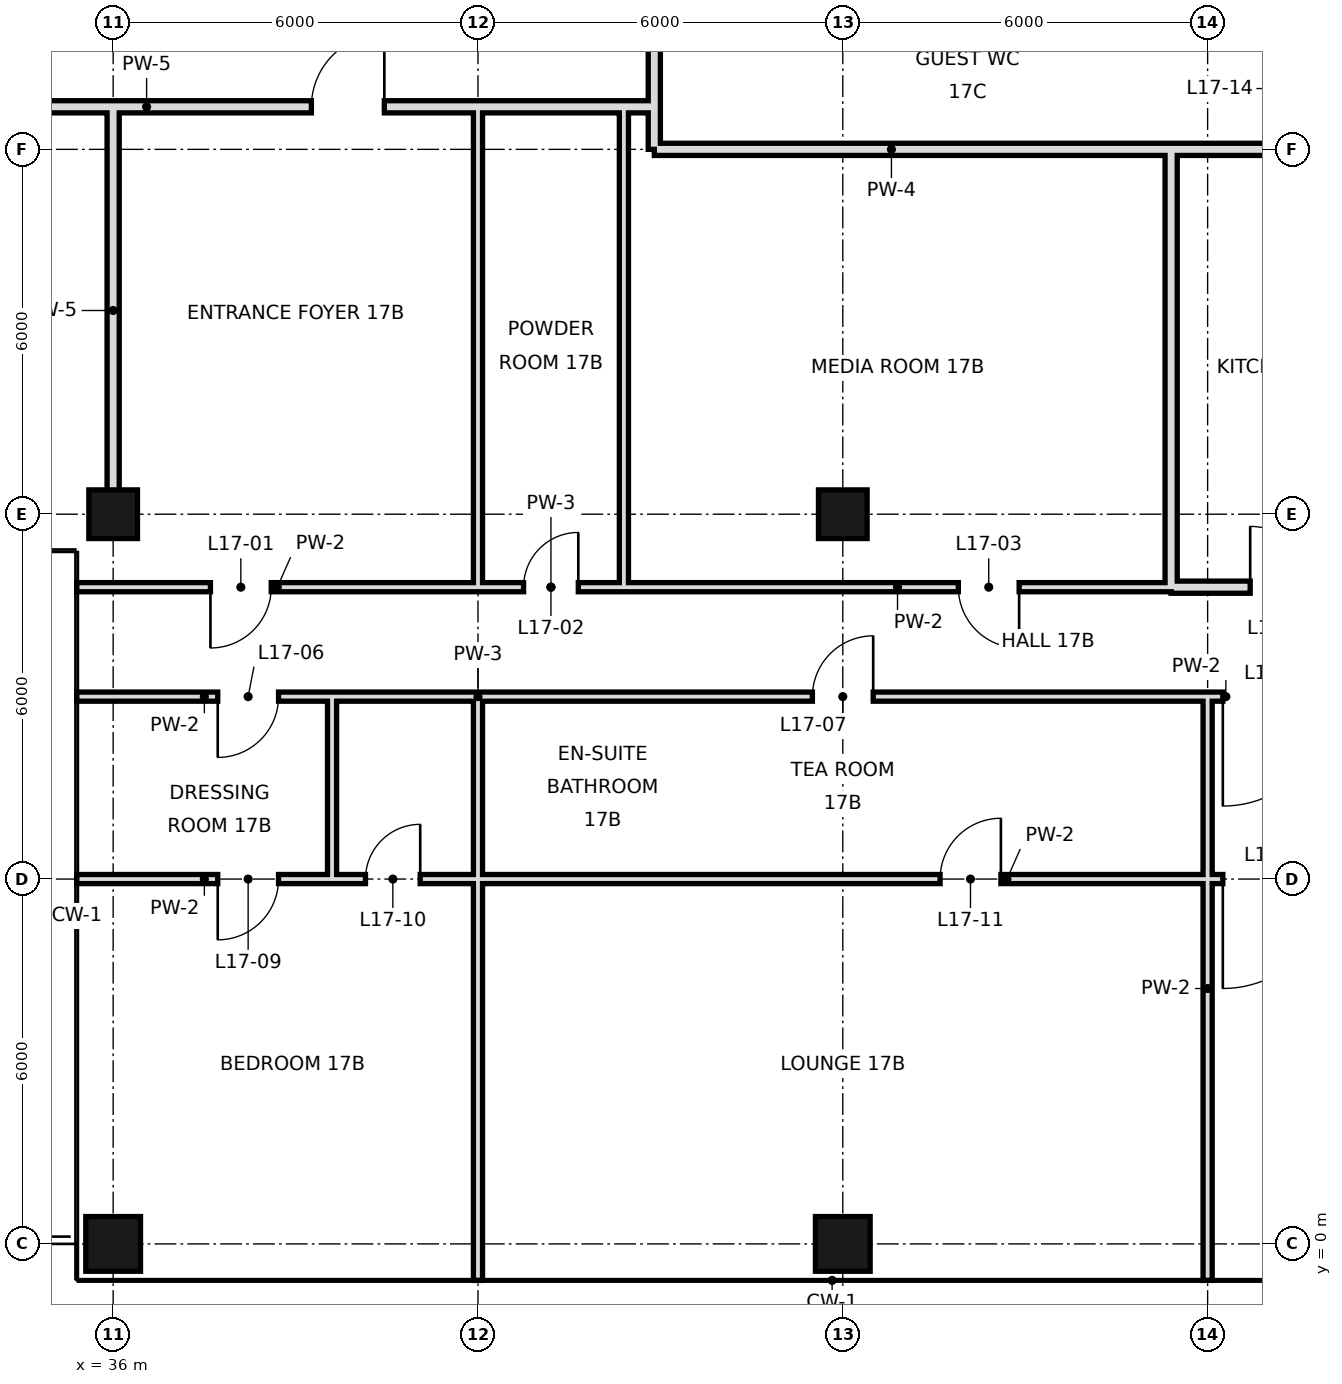
"""IFC4 building model, lengths in metres.
Left out: names, types, materials, properties, quantities, classifications, styles, units other than length and angle.
Written with IfcOpenShell. Run it as: python <this file> out.ifc"""

import sys

from ifc_helpers import new_model, si_unit, direction, frame, frame_2d, origin, origin_2d, place, context, subcontext, project, spatial, rectangle, hollow_rectangle, extrude, element, fill, save


model = new_model("IFC4")
c1 = context("Model", 3, precision=1e-05, world=origin(), true_north=direction((0.0, 1.0)))
c2 = subcontext(c1, "Body", "Model", "MODEL_VIEW")
j1 = project(units=[si_unit("LENGTHUNIT", "METRE"), si_unit("PLANEANGLEUNIT", "RADIAN")], contexts=[c1])
p1 = place(None, origin())
s1 = spatial("IfcSite", under=j1, at=p1, CompositionType="ELEMENT")
p2 = place(p1, origin())
s2 = spatial("IfcBuilding", under=s1, at=p2, CompositionType="ELEMENT")
p3 = place(p2, frame((0.0, 0.0, 82.2)))
s3 = spatial("IfcBuildingStorey", under=s2, at=p3, CompositionType="ELEMENT", Elevation=82.2)
p4 = place(p3, frame((36.0, 0.0, 0.0), z_axis=(0.0, 0.0, 1.0), x_axis=(1.0, 0.0, 0.0)))
e1 = element("IfcColumn", 1, at=p4, inside=s3, PredefinedType="COLUMN", context=c2, shape_type="SweptSolid", body=[
    extrude(hollow_rectangle(XDim=0.9, YDim=0.9, WallThickness=0.045, at=origin_2d()), origin(), (0.0, 0.0, 1.0), 3.6),
])
p5 = place(p3, frame((36.0, 12.0, 0.0), z_axis=(0.0, 0.0, 1.0), x_axis=(1.0, 0.0, 0.0)))
e2 = element("IfcColumn", 2, at=p5, inside=s3, PredefinedType="COLUMN", context=c2, shape_type="SweptSolid", body=[
    extrude(hollow_rectangle(XDim=0.8, YDim=0.8, WallThickness=0.04, at=origin_2d()), origin(), (0.0, 0.0, 1.0), 3.6),
])
p6 = place(p3, frame((48.0, 0.0, 0.0), z_axis=(0.0, 0.0, 1.0), x_axis=(1.0, 0.0, 0.0)))
e3 = element("IfcColumn", 3, at=p6, inside=s3, PredefinedType="COLUMN", context=c2, shape_type="SweptSolid", body=[
    extrude(hollow_rectangle(XDim=0.9, YDim=0.9, WallThickness=0.045, at=origin_2d()), origin(), (0.0, 0.0, 1.0), 3.6),
])
p7 = place(p3, frame((48.0, 12.0, 0.0), z_axis=(0.0, 0.0, 1.0), x_axis=(1.0, 0.0, 0.0)))
e4 = element("IfcColumn", 4, at=p7, inside=s3, PredefinedType="COLUMN", context=c2, shape_type="SweptSolid", body=[
    extrude(hollow_rectangle(XDim=0.8, YDim=0.8, WallThickness=0.04, at=origin_2d()), origin(), (0.0, 0.0, 1.0), 3.6),
])
p8 = place(p3, frame((36.0, 12.0, 0.0), z_axis=(0.0, 0.0, 1.0), x_axis=(0.0, 1.0, 0.0)))
e5 = element("IfcWall", 5, at=p8, inside=s3, PredefinedType="SOLIDWALL", context=c2, shape_type="SweptSolid", body=[
    extrude(rectangle(XDim=6.7, YDim=0.2, at=frame_2d((3.35, 0.0))), origin(), (0.0, 0.0, 1.0), 2.72),
])
p9 = place(p3, frame((39.6, 6.0, 0.0), z_axis=(0.0, 0.0, 1.0), x_axis=(0.0, 1.0, 0.0)))
e6 = element("IfcWall", 6, at=p9, inside=s3, PredefinedType="PARTITIONING", context=c2, shape_type="SweptSolid", body=[
    extrude(rectangle(XDim=3.0, YDim=0.15, at=frame_2d((1.5, 0.0))), origin(), (0.0, 0.0, 1.0), 3.42),
])
p10 = place(p3, frame((42.0, -0.6, 0.0), z_axis=(0.0, 0.0, 1.0), x_axis=(0.0, 1.0, 0.0)))
e7 = element("IfcWall", 7, at=p10, inside=s3, PredefinedType="PARTITIONING", context=c2, shape_type="SweptSolid", body=[
    extrude(rectangle(XDim=6.6, YDim=0.15, at=frame_2d((3.3, 0.0))), origin(), (0.0, 0.0, 1.0), 2.72),
])
p11 = place(p3, frame((42.0, 6.0, 0.0), z_axis=(0.0, 0.0, 1.0), x_axis=(0.0, 1.0, 0.0)))
e8 = element("IfcWall", 8, at=p11, inside=s3, PredefinedType="PARTITIONING", context=c2, shape_type="SweptSolid", body=[
    extrude(rectangle(XDim=3.0, YDim=0.15, at=frame_2d((1.5, 0.0))), origin(), (0.0, 0.0, 1.0), 2.72),
])
p12 = place(p3, frame((42.0, 10.8, 0.0), z_axis=(0.0, 0.0, 1.0), x_axis=(0.0, 1.0, 0.0)))
e9 = element("IfcWall", 9, at=p12, inside=s3, PredefinedType="PARTITIONING", context=c2, shape_type="SweptSolid", body=[
    extrude(rectangle(XDim=7.9, YDim=0.15, at=frame_2d((3.95, 0.0))), origin(), (0.0, 0.0, 1.0), 2.72),
])
p13 = place(p3, frame((44.4, 10.8, 0.0), z_axis=(0.0, 0.0, 1.0), x_axis=(0.0, 1.0, 0.0)))
e10 = element("IfcWall", 10, at=p13, inside=s3, PredefinedType="PARTITIONING", context=c2, shape_type="SweptSolid", body=[
    extrude(rectangle(XDim=7.9, YDim=0.15, at=frame_2d((3.95, 0.0))), origin(), (0.0, 0.0, 1.0), 3.42),
])
p14 = place(p3, frame((44.9, 18.7, 0.0), z_axis=(0.0, 0.0, 1.0), x_axis=(0.0, 1.0, 0.0)))
e11 = element("IfcWall", 11, at=p14, inside=s3, PredefinedType="SOLIDWALL", context=c2, shape_type="SweptSolid", body=[
    extrude(rectangle(XDim=25.1, YDim=0.2, at=frame_2d((12.55, 0.0))), origin(), (0.0, 0.0, 1.0), 2.97),
])
p15 = place(p14, frame((22.32, 0.0, 0.0)))
e12 = element("IfcOpeningElement", 12, at=p15, cuts=e11, PredefinedType="OPENING", context=c2, shape_type="SweptSolid", body=[
    extrude(rectangle(XDim=1.2, YDim=2.4, at=frame_2d((0.6, 1.2))), frame((0.0, 0.11, 0.0), z_axis=(0.0, -1.0, 0.0), x_axis=(1.0, 0.0, 0.0)), (0.0, 0.0, 1.0), 0.22),
])
p16 = place(p3, frame((44.9, 18.0, 0.0), z_axis=(0.0, 0.0, 1.0), x_axis=(0.0, 1.0, 0.0)))
e13 = element("IfcWall", 13, at=p16, inside=s3, PredefinedType="SOLIDWALL", context=c2, shape_type="SweptSolid", body=[
    extrude(rectangle(XDim=0.7, YDim=0.2, at=frame_2d((0.35, 0.0))), origin(), (0.0, 0.0, 1.0), 2.97),
])
p17 = place(p3, frame((53.4, 10.8, 0.0), z_axis=(0.0, 0.0, 1.0), x_axis=(0.0, 1.0, 0.0)))
e14 = element("IfcWall", 14, at=p17, inside=s3, PredefinedType="SOLIDWALL", context=c2, shape_type="SweptSolid", body=[
    extrude(rectangle(XDim=7.2, YDim=0.2, at=frame_2d((3.6, 0.0))), origin(), (0.0, 0.0, 1.0), 2.52),
])
p18 = place(p3, frame((54.0, -0.6, 0.0), z_axis=(0.0, 0.0, 1.0), x_axis=(0.0, 1.0, 0.0)))
e15 = element("IfcWall", 15, at=p18, inside=s3, PredefinedType="PARTITIONING", context=c2, shape_type="SweptSolid", body=[
    extrude(rectangle(XDim=9.6, YDim=0.15, at=frame_2d((4.8, 0.0))), origin(), (0.0, 0.0, 1.0), 3.42),
])
p19 = place(p3, frame((53.4, 10.8, 0.0), z_axis=(0.0, 0.0, 1.0), x_axis=(1.0, 0.0, 0.0)))
e16 = element("IfcWall", 16, at=p19, inside=s3, PredefinedType="SOLIDWALL", context=c2, shape_type="SweptSolid", body=[
    extrude(rectangle(XDim=3.6, YDim=0.2, at=frame_2d((1.8, 0.0))), origin(), (0.0, 0.0, 1.0), 3.42),
])
p20 = place(p19, frame((1.3, 0.0, 0.0)))
e17 = element("IfcOpeningElement", 17, at=p20, cuts=e16, PredefinedType="OPENING", context=c2, shape_type="SweptSolid", body=[
    extrude(rectangle(XDim=1.0, YDim=2.4, at=frame_2d((0.5, 1.2))), frame((0.0, 0.11, 0.0), z_axis=(0.0, -1.0, 0.0), x_axis=(1.0, 0.0, 0.0)), (0.0, 0.0, 1.0), 0.22),
])
p21 = place(p3, frame((35.4, 10.8, 0.0), z_axis=(0.0, 0.0, 1.0), x_axis=(1.0, 0.0, 0.0)))
e18 = element("IfcWall", 18, at=p21, inside=s3, PredefinedType="PARTITIONING", context=c2, shape_type="SweptSolid", body=[
    extrude(rectangle(XDim=6.6, YDim=0.15, at=frame_2d((3.3, 0.0))), origin(), (0.0, 0.0, 1.0), 3.42),
])
p22 = place(p21, frame((2.2, 0.0, 0.0)))
e19 = element("IfcOpeningElement", 19, at=p22, cuts=e18, PredefinedType="OPENING", context=c2, shape_type="SweptSolid", body=[
    extrude(rectangle(XDim=1.0, YDim=2.4, at=frame_2d((0.5, 1.2))), frame((0.0, 0.085, 0.0), z_axis=(0.0, -1.0, 0.0), x_axis=(1.0, 0.0, 0.0)), (0.0, 0.0, 1.0), 0.17),
])
p23 = place(p3, frame((44.4, 10.8, 0.0), z_axis=(0.0, 0.0, 1.0), x_axis=(1.0, 0.0, 0.0)))
e20 = element("IfcWall", 20, at=p23, inside=s3, PredefinedType="PARTITIONING", context=c2, shape_type="SweptSolid", body=[
    extrude(rectangle(XDim=9.0, YDim=0.15, at=frame_2d((4.5, 0.0))), origin(), (0.0, 0.0, 1.0), 3.42),
])
p24 = place(p23, frame((5.5, 0.0, 0.0)))
e21 = element("IfcOpeningElement", 21, at=p24, cuts=e20, PredefinedType="OPENING", context=c2, shape_type="SweptSolid", body=[
    extrude(rectangle(XDim=1.0, YDim=2.4, at=frame_2d((0.5, 1.2))), frame((0.0, 0.085, 0.0), z_axis=(0.0, -1.0, 0.0), x_axis=(1.0, 0.0, 0.0)), (0.0, 0.0, 1.0), 0.17),
])
p25 = place(p3, frame((42.0, 10.8, 0.0), z_axis=(0.0, 0.0, 1.0), x_axis=(1.0, 0.0, 0.0)))
e22 = element("IfcWall", 22, at=p25, inside=s3, PredefinedType="PARTITIONING", context=c2, shape_type="SweptSolid", body=[
    extrude(rectangle(XDim=2.4, YDim=0.15, at=frame_2d((1.2, 0.0))), origin(), (0.0, 0.0, 1.0), 3.42),
])
p26 = place(p25, frame((0.75, 0.0, 0.0)))
e23 = element("IfcOpeningElement", 23, at=p26, cuts=e22, PredefinedType="OPENING", context=c2, shape_type="SweptSolid", body=[
    extrude(rectangle(XDim=0.9, YDim=2.4, at=frame_2d((0.45, 1.2))), frame((0.0, 0.085, 0.0), z_axis=(0.0, -1.0, 0.0), x_axis=(1.0, 0.0, 0.0)), (0.0, 0.0, 1.0), 0.17),
])
p27 = place(p3, frame((53.4, 18.0, 0.0), z_axis=(0.0, 0.0, 1.0), x_axis=(1.0, 0.0, 0.0)))
e24 = element("IfcWall", 24, at=p27, inside=s3, PredefinedType="SOLIDWALL", context=c2, shape_type="SweptSolid", body=[
    extrude(rectangle(XDim=3.6, YDim=0.2, at=frame_2d((1.8, 0.0))), origin(), (0.0, 0.0, 1.0), 2.52),
])
p28 = place(p3, frame((44.9, 18.0, 0.0), z_axis=(0.0, 0.0, 1.0), x_axis=(1.0, 0.0, 0.0)))
e25 = element("IfcWall", 25, at=p28, inside=s3, PredefinedType="SOLIDWALL", context=c2, shape_type="SweptSolid", body=[
    extrude(rectangle(XDim=8.5, YDim=0.2, at=frame_2d((4.25, 0.0))), origin(), (0.0, 0.0, 1.0), 2.52),
])
p29 = place(p3, frame((3.1, 18.7, 0.0), z_axis=(0.0, 0.0, 1.0), x_axis=(1.0, 0.0, 0.0)))
e26 = element("IfcWall", 26, at=p29, inside=s3, PredefinedType="SOLIDWALL", context=c2, shape_type="SweptSolid", body=[
    extrude(rectangle(XDim=41.8, YDim=0.2, at=frame_2d((20.9, 0.0))), origin(), (0.0, 0.0, 1.0), 2.72),
])
p30 = place(p29, frame((36.16, 0.0, 0.0)))
e27 = element("IfcOpeningElement", 27, at=p30, cuts=e26, PredefinedType="OPENING", context=c2, shape_type="SweptSolid", body=[
    extrude(rectangle(XDim=1.2, YDim=2.4, at=frame_2d((0.6, 1.2))), frame((0.0, 0.11, 0.0), z_axis=(0.0, -1.0, 0.0), x_axis=(1.0, 0.0, 0.0)), (0.0, 0.0, 1.0), 0.22),
])
p31 = place(p29, frame((15.55, 0.0, 0.0)))
e28 = element("IfcOpeningElement", 28, at=p31, cuts=e26, PredefinedType="OPENING", context=c2, shape_type="SweptSolid", body=[
    extrude(rectangle(XDim=1.8, YDim=2.4, at=frame_2d((0.9, 1.2))), frame((0.0, 0.11, 0.0), z_axis=(0.0, -1.0, 0.0), x_axis=(1.0, 0.0, 0.0)), (0.0, 0.0, 1.0), 0.22),
])
p32 = place(p3, frame((35.4, 6.0, 0.0), z_axis=(0.0, 0.0, 1.0), x_axis=(1.0, 0.0, 0.0)))
e29 = element("IfcWall", 29, at=p32, inside=s3, PredefinedType="PARTITIONING", context=c2, shape_type="SweptSolid", body=[
    extrude(rectangle(XDim=4.2, YDim=0.15, at=frame_2d((2.1, 0.0))), origin(), (0.0, 0.0, 1.0), 2.97),
])
p33 = place(p32, frame((2.32, 0.0, 0.0)))
e30 = element("IfcOpeningElement", 30, at=p33, cuts=e29, PredefinedType="OPENING", context=c2, shape_type="SweptSolid", body=[
    extrude(rectangle(XDim=1.0, YDim=2.4, at=frame_2d((0.5, 1.2))), frame((0.0, 0.085, 0.0), z_axis=(0.0, -1.0, 0.0), x_axis=(1.0, 0.0, 0.0)), (0.0, 0.0, 1.0), 0.17),
])
p34 = place(p3, frame((42.0, 6.0, 0.0), z_axis=(0.0, 0.0, 1.0), x_axis=(1.0, 0.0, 0.0)))
e31 = element("IfcWall", 31, at=p34, inside=s3, PredefinedType="PARTITIONING", context=c2, shape_type="SweptSolid", body=[
    extrude(rectangle(XDim=24.0, YDim=0.15, at=frame_2d((12.0, 0.0))), origin(), (0.0, 0.0, 1.0), 2.52),
])
p35 = place(p34, frame((7.6, 0.0, 0.0)))
e32 = element("IfcOpeningElement", 32, at=p35, cuts=e31, PredefinedType="OPENING", context=c2, shape_type="SweptSolid", body=[
    extrude(rectangle(XDim=1.0, YDim=2.4, at=frame_2d((0.5, 1.2))), frame((0.0, 0.085, 0.0), z_axis=(0.0, -1.0, 0.0), x_axis=(1.0, 0.0, 0.0)), (0.0, 0.0, 1.0), 0.17),
])
p36 = place(p34, frame((12.25, 0.0, 0.0)))
e33 = element("IfcOpeningElement", 33, at=p36, cuts=e31, PredefinedType="OPENING", context=c2, shape_type="SweptSolid", body=[
    extrude(rectangle(XDim=1.8, YDim=2.4, at=frame_2d((0.9, 1.2))), frame((0.0, 0.085, 0.0), z_axis=(0.0, -1.0, 0.0), x_axis=(1.0, 0.0, 0.0)), (0.0, 0.0, 1.0), 0.17),
])
p37 = place(p3, frame((39.6, 6.0, 0.0), z_axis=(0.0, 0.0, 1.0), x_axis=(1.0, 0.0, 0.0)))
e34 = element("IfcWall", 34, at=p37, inside=s3, PredefinedType="PARTITIONING", context=c2, shape_type="SweptSolid", body=[
    extrude(rectangle(XDim=2.4, YDim=0.15, at=frame_2d((1.2, 0.0))), origin(), (0.0, 0.0, 1.0), 2.97),
])
p38 = place(p37, frame((0.55, 0.0, 0.0)))
e35 = element("IfcOpeningElement", 35, at=p38, cuts=e34, PredefinedType="OPENING", context=c2, shape_type="SweptSolid", body=[
    extrude(rectangle(XDim=0.9, YDim=2.4, at=frame_2d((0.45, 1.2))), frame((0.0, 0.085, 0.0), z_axis=(0.0, -1.0, 0.0), x_axis=(1.0, 0.0, 0.0)), (0.0, 0.0, 1.0), 0.17),
])
p39 = place(p3, frame((35.4, 9.0, 0.0), z_axis=(0.0, 0.0, 1.0), x_axis=(1.0, 0.0, 0.0)))
e36 = element("IfcWall", 36, at=p39, inside=s3, PredefinedType="PARTITIONING", context=c2, shape_type="SweptSolid", body=[
    extrude(rectangle(XDim=4.2, YDim=0.15, at=frame_2d((2.1, 0.0))), origin(), (0.0, 0.0, 1.0), 3.42),
])
p40 = place(p39, frame((2.32, 0.0, 0.0)))
e37 = element("IfcOpeningElement", 37, at=p40, cuts=e36, PredefinedType="OPENING", context=c2, shape_type="SweptSolid", body=[
    extrude(rectangle(XDim=1.0, YDim=2.4, at=frame_2d((0.5, 1.2))), frame((0.0, 0.085, 0.0), z_axis=(0.0, -1.0, 0.0), x_axis=(1.0, 0.0, 0.0)), (0.0, 0.0, 1.0), 0.17),
])
p41 = place(p3, frame((42.0, 9.0, 0.0), z_axis=(0.0, 0.0, 1.0), x_axis=(1.0, 0.0, 0.0)))
e38 = element("IfcWall", 38, at=p41, inside=s3, PredefinedType="PARTITIONING", context=c2, shape_type="SweptSolid", body=[
    extrude(rectangle(XDim=24.6, YDim=0.15, at=frame_2d((12.3, 0.0))), origin(), (0.0, 0.0, 1.0), 3.42),
])
p42 = place(p41, frame((5.5, 0.0, 0.0)))
e39 = element("IfcOpeningElement", 39, at=p42, cuts=e38, PredefinedType="OPENING", context=c2, shape_type="SweptSolid", body=[
    extrude(rectangle(XDim=1.0, YDim=2.4, at=frame_2d((0.5, 1.2))), frame((0.0, 0.085, 0.0), z_axis=(0.0, -1.0, 0.0), x_axis=(1.0, 0.0, 0.0)), (0.0, 0.0, 1.0), 0.17),
])
p43 = place(p41, frame((12.25, 0.0, 0.0)))
e40 = element("IfcOpeningElement", 40, at=p43, cuts=e38, PredefinedType="OPENING", context=c2, shape_type="SweptSolid", body=[
    extrude(rectangle(XDim=1.8, YDim=2.4, at=frame_2d((0.9, 1.2))), frame((0.0, 0.085, 0.0), z_axis=(0.0, -1.0, 0.0), x_axis=(1.0, 0.0, 0.0)), (0.0, 0.0, 1.0), 0.17),
])
p44 = place(p3, frame((39.6, 9.0, 0.0), z_axis=(0.0, 0.0, 1.0), x_axis=(1.0, 0.0, 0.0)))
e41 = element("IfcWall", 41, at=p44, inside=s3, PredefinedType="PARTITIONING", context=c2, shape_type="SweptSolid", body=[
    extrude(rectangle(XDim=2.4, YDim=0.15, at=frame_2d((1.2, 0.0))), origin(), (0.0, 0.0, 1.0), 3.42),
])
p45 = place(p22, frame((1.0, 0.0, 0.0), z_axis=(0.0, 0.0, 1.0), x_axis=(-1.0, 0.0, 0.0)))
e42 = element("IfcDoor", 42, at=p45, inside=s3, OperationType="SINGLE_SWING_RIGHT", PredefinedType="DOOR", context=c2, shape_type="SweptSolid", body=[
    extrude(rectangle(XDim=1.0, YDim=2.4, at=frame_2d((0.5, 1.2))), frame((0.0, 0.025, 0.0), z_axis=(0.0, -1.0, 0.0), x_axis=(1.0, 0.0, 0.0)), (0.0, 0.0, 1.0), 0.05),
])
fill(e19, e42)
p46 = place(p26, frame((0.9, 0.0, 0.0), z_axis=(0.0, 0.0, 1.0), x_axis=(-1.0, 0.0, 0.0)))
e43 = element("IfcDoor", 43, at=p46, inside=s3, OperationType="SINGLE_SWING_LEFT", PredefinedType="DOOR", context=c2, shape_type="SweptSolid", body=[
    extrude(rectangle(XDim=0.9, YDim=2.4, at=frame_2d((0.45, 1.2))), frame((0.0, 0.025, 0.0), z_axis=(0.0, -1.0, 0.0), x_axis=(1.0, 0.0, 0.0)), (0.0, 0.0, 1.0), 0.05),
])
fill(e23, e43)
p47 = place(p24, origin())
e44 = element("IfcDoor", 44, at=p47, inside=s3, OperationType="SINGLE_SWING_RIGHT", PredefinedType="DOOR", context=c2, shape_type="SweptSolid", body=[
    extrude(rectangle(XDim=1.0, YDim=2.4, at=frame_2d((0.5, 1.2))), frame((0.0, 0.025, 0.0), z_axis=(0.0, -1.0, 0.0), x_axis=(1.0, 0.0, 0.0)), (0.0, 0.0, 1.0), 0.05),
])
fill(e21, e44)
p48 = place(p20, origin())
e45 = element("IfcDoor", 45, at=p48, inside=s3, OperationType="SINGLE_SWING_LEFT", PredefinedType="DOOR", context=c2, shape_type="SweptSolid", body=[
    extrude(rectangle(XDim=1.0, YDim=2.4, at=frame_2d((0.5, 1.2))), frame((0.0, 0.025, 0.0), z_axis=(0.0, -1.0, 0.0), x_axis=(1.0, 0.0, 0.0)), (0.0, 0.0, 1.0), 0.05),
])
fill(e17, e45)
p49 = place(p40, frame((1.0, 0.0, 0.0), z_axis=(0.0, 0.0, 1.0), x_axis=(-1.0, 0.0, 0.0)))
e46 = element("IfcDoor", 46, at=p49, inside=s3, OperationType="SINGLE_SWING_RIGHT", PredefinedType="DOOR", context=c2, shape_type="SweptSolid", body=[
    extrude(rectangle(XDim=1.0, YDim=2.4, at=frame_2d((0.5, 1.2))), frame((0.0, 0.025, 0.0), z_axis=(0.0, -1.0, 0.0), x_axis=(1.0, 0.0, 0.0)), (0.0, 0.0, 1.0), 0.05),
])
fill(e37, e46)
p50 = place(p42, frame((1.0, 0.0, 0.0), z_axis=(0.0, 0.0, 1.0), x_axis=(-1.0, 0.0, 0.0)))
e47 = element("IfcDoor", 47, at=p50, inside=s3, OperationType="SINGLE_SWING_LEFT", PredefinedType="DOOR", context=c2, shape_type="SweptSolid", body=[
    extrude(rectangle(XDim=1.0, YDim=2.4, at=frame_2d((0.5, 1.2))), frame((0.0, 0.025, 0.0), z_axis=(0.0, -1.0, 0.0), x_axis=(1.0, 0.0, 0.0)), (0.0, 0.0, 1.0), 0.05),
])
fill(e39, e47)
p51 = place(p43, frame((1.8, 0.0, 0.0), z_axis=(0.0, 0.0, 1.0), x_axis=(-1.0, 0.0, 0.0)))
e48 = element("IfcDoor", 48, at=p51, inside=s3, OperationType="SINGLE_SWING_RIGHT", PredefinedType="DOOR", context=c2, shape_type="SweptSolid", body=[
    extrude(rectangle(XDim=1.8, YDim=2.4, at=frame_2d((0.9, 1.2))), frame((0.0, 0.025, 0.0), z_axis=(0.0, -1.0, 0.0), x_axis=(1.0, 0.0, 0.0)), (0.0, 0.0, 1.0), 0.05),
])
fill(e40, e48)
p52 = place(p33, frame((1.0, 0.0, 0.0), z_axis=(0.0, 0.0, 1.0), x_axis=(-1.0, 0.0, 0.0)))
e49 = element("IfcDoor", 49, at=p52, inside=s3, OperationType="SINGLE_SWING_RIGHT", PredefinedType="DOOR", context=c2, shape_type="SweptSolid", body=[
    extrude(rectangle(XDim=1.0, YDim=2.4, at=frame_2d((0.5, 1.2))), frame((0.0, 0.025, 0.0), z_axis=(0.0, -1.0, 0.0), x_axis=(1.0, 0.0, 0.0)), (0.0, 0.0, 1.0), 0.05),
])
fill(e30, e49)
p53 = place(p38, frame((0.9, 0.0, 0.0), z_axis=(0.0, 0.0, 1.0), x_axis=(-1.0, 0.0, 0.0)))
e50 = element("IfcDoor", 50, at=p53, inside=s3, OperationType="SINGLE_SWING_LEFT", PredefinedType="DOOR", context=c2, shape_type="SweptSolid", body=[
    extrude(rectangle(XDim=0.9, YDim=2.4, at=frame_2d((0.45, 1.2))), frame((0.0, 0.025, 0.0), z_axis=(0.0, -1.0, 0.0), x_axis=(1.0, 0.0, 0.0)), (0.0, 0.0, 1.0), 0.05),
])
fill(e35, e50)
p54 = place(p35, frame((1.0, 0.0, 0.0), z_axis=(0.0, 0.0, 1.0), x_axis=(-1.0, 0.0, 0.0)))
e51 = element("IfcDoor", 51, at=p54, inside=s3, OperationType="SINGLE_SWING_LEFT", PredefinedType="DOOR", context=c2, shape_type="SweptSolid", body=[
    extrude(rectangle(XDim=1.0, YDim=2.4, at=frame_2d((0.5, 1.2))), frame((0.0, 0.025, 0.0), z_axis=(0.0, -1.0, 0.0), x_axis=(1.0, 0.0, 0.0)), (0.0, 0.0, 1.0), 0.05),
])
fill(e32, e51)
p55 = place(p36, frame((1.8, 0.0, 0.0), z_axis=(0.0, 0.0, 1.0), x_axis=(-1.0, 0.0, 0.0)))
e52 = element("IfcDoor", 52, at=p55, inside=s3, OperationType="SINGLE_SWING_RIGHT", PredefinedType="DOOR", context=c2, shape_type="SweptSolid", body=[
    extrude(rectangle(XDim=1.8, YDim=2.4, at=frame_2d((0.9, 1.2))), frame((0.0, 0.025, 0.0), z_axis=(0.0, -1.0, 0.0), x_axis=(1.0, 0.0, 0.0)), (0.0, 0.0, 1.0), 0.05),
])
fill(e33, e52)
p56 = place(p30, frame((1.2, 0.0, 0.0), z_axis=(0.0, 0.0, 1.0), x_axis=(-1.0, 0.0, 0.0)))
e53 = element("IfcDoor", 53, at=p56, inside=s3, OperationType="SINGLE_SWING_LEFT", PredefinedType="DOOR", context=c2, shape_type="SweptSolid", body=[
    extrude(rectangle(XDim=1.2, YDim=2.4, at=frame_2d((0.6, 1.2))), frame((0.0, 0.025, 0.0), z_axis=(0.0, -1.0, 0.0), x_axis=(1.0, 0.0, 0.0)), (0.0, 0.0, 1.0), 0.05),
])
fill(e27, e53)
save(model, sys.argv[1])
